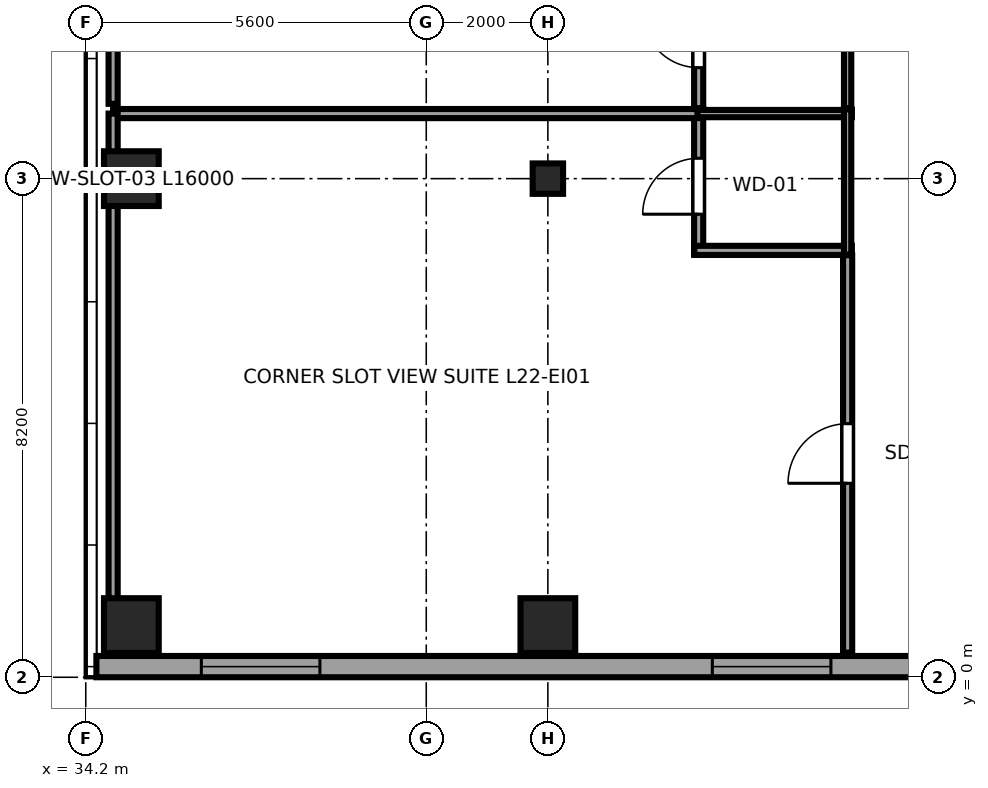
"""IFC4 building model, lengths in metres.
Left out: names, types, materials, properties, quantities, classifications, styles, units other than length and angle.
Written with IfcOpenShell. Run it as: python <this file> out.ifc"""

import sys

from ifc_helpers import new_model, si_unit, direction, frame, frame_2d, origin, origin_2d, place, context, subcontext, project, spatial, rectangle, i_section, extrude, source, transform, mapped, element, fill, save


model = new_model("IFC4")
c1 = context("Model", 3, precision=1e-05, world=origin(), true_north=direction((0.0, 1.0)))
c2 = subcontext(c1, "Body", "Model", "MODEL_VIEW")
j1 = project(units=[si_unit("LENGTHUNIT", "METRE"), si_unit("PLANEANGLEUNIT", "RADIAN")], contexts=[c1])
p1 = place(None, origin())
s1 = spatial("IfcSite", under=j1, at=p1, CompositionType="ELEMENT")
p2 = place(p1, origin())
s2 = spatial("IfcBuilding", under=s1, at=p2, CompositionType="ELEMENT")
p3 = place(p2, frame((0.0, 0.0, 88.8)))
s3 = spatial("IfcBuildingStorey", under=s2, at=p3, CompositionType="ELEMENT", Elevation=88.8)
m1 = source(origin(), c2, "Body", "SweptSolid", [
    extrude(rectangle(XDim=0.9, YDim=0.9, at=origin_2d()), origin(), (0.0, 0.0, 1.0), 3.55),
])
for number, where, z_axis, x_axis in (
    (1, (34.95, 0.85, 0.0), (0.0, 0.0, 1.0), (1.0, 0.0, 0.0)),
    (2, (34.95, 8.2, 0.0), (0.0, 0.0, 1.0), (1.0, 0.0, 0.0)),
    (3, (41.8, 0.85, 0.0), (0.0, 0.0, 1.0), (1.0, 0.0, 0.0)),
):
    element("IfcColumn", number, at=place(p3, frame(where, z_axis=z_axis, x_axis=x_axis)), inside=s3, PredefinedType="COLUMN", context=c2, shape_type="MappedRepresentation", body=[
        mapped(m1, transform((0.0, 0.0, 0.0), x_axis=(1.0, 0.0, 0.0), y_axis=(0.0, 1.0, 0.0), z_axis=(0.0, 0.0, 1.0), scale=1.0)),
    ])
m2 = source(origin(), c2, "Body", "SweptSolid", [
    extrude(i_section(OverallWidth=0.5, OverallDepth=0.5, WebThickness=0.022, FlangeThickness=0.034, at=origin_2d()), origin(), (0.0, 0.0, 1.0), 3.55),
])
p4 = place(p3, frame((41.8, 8.2, 0.0), z_axis=(0.0, 0.0, 1.0), x_axis=(1.0, 0.0, 0.0)))
e4 = element("IfcColumn", 4, at=p4, inside=s3, PredefinedType="COLUMN", context=c2, shape_type="MappedRepresentation", body=[
    mapped(m2, transform((0.0, 0.0, 0.0), x_axis=(1.0, 0.0, 0.0), y_axis=(0.0, 1.0, 0.0), z_axis=(0.0, 0.0, 1.0), scale=1.0)),
])
p5 = place(p3, frame((34.375, 0.175, 0.0), z_axis=(0.0, 0.0, 1.0), x_axis=(1.0, 0.0, 0.0)))
e5 = element("IfcWall", 5, at=p5, inside=s3, PredefinedType="SOLIDWALL", context=c2, shape_type="SweptSolid", body=[
    extrude(rectangle(XDim=18.008, YDim=0.35, at=frame_2d((9.004, 0.0))), origin(), (0.0, 0.0, 1.0), 3.37),
])
p6 = place(p5, frame((1.726, 0.0, 0.68)))
e6 = element("IfcOpeningElement", 6, at=p6, cuts=e5, PredefinedType="OPENING", context=c2, shape_type="SweptSolid", body=[
    extrude(rectangle(XDim=1.95, YDim=1.82, at=frame_2d((0.975, 0.91))), frame((0.0, 0.185, 0.0), z_axis=(0.0, -1.0, 0.0), x_axis=(1.0, 0.0, 0.0)), (0.0, 0.0, 1.0), 0.37),
])
p7 = place(p5, frame((10.13, 0.0, 0.68)))
e7 = element("IfcOpeningElement", 7, at=p7, cuts=e5, PredefinedType="OPENING", context=c2, shape_type="SweptSolid", body=[
    extrude(rectangle(XDim=1.95, YDim=1.82, at=frame_2d((0.975, 0.91))), frame((0.0, 0.185, 0.0), z_axis=(0.0, -1.0, 0.0), x_axis=(1.0, 0.0, 0.0)), (0.0, 0.0, 1.0), 0.37),
])
p8 = place(p3, frame((44.28, 6.95, 0.0), z_axis=(0.0, 0.0, 1.0), x_axis=(0.0, 1.0, 0.0)))
e8 = element("IfcWall", 8, at=p8, inside=s3, PredefinedType="PARTITIONING", context=c2, shape_type="SweptSolid", body=[
    extrude(rectangle(XDim=2.39, YDim=0.15, at=frame_2d((1.195, 0.0))), origin(), (0.0, 0.0, 1.0), 3.37),
])
p9 = place(p8, frame((0.665, 0.0, 0.0)))
e9 = element("IfcOpeningElement", 9, at=p9, cuts=e8, PredefinedType="OPENING", context=c2, shape_type="SweptSolid", body=[
    extrude(rectangle(XDim=0.92, YDim=2.01, at=frame_2d((0.46, 1.005))), frame((0.0, 0.085, 0.0), z_axis=(0.0, -1.0, 0.0), x_axis=(1.0, 0.0, 0.0)), (0.0, 0.0, 1.0), 0.17),
])
p10 = place(p3, frame((44.21, 7.02, 0.0), z_axis=(0.0, 0.0, 1.0), x_axis=(1.0, 0.0, 0.0)))
e10 = element("IfcWall", 10, at=p10, inside=s3, PredefinedType="PARTITIONING", context=c2, shape_type="SweptSolid", body=[
    extrude(rectangle(XDim=2.59, YDim=0.15, at=frame_2d((1.295, 0.0))), origin(), (0.0, 0.0, 1.0), 3.37),
])
p11 = place(p3, frame((44.21, 9.27, 0.0), z_axis=(0.0, 0.0, 1.0), x_axis=(1.0, 0.0, 0.0)))
e11 = element("IfcWall", 11, at=p11, inside=s3, PredefinedType="PLUMBINGWALL", context=c2, shape_type="SweptSolid", body=[
    extrude(rectangle(XDim=2.59, YDim=0.12, at=frame_2d((1.295, 0.0))), origin(), (0.0, 0.0, 1.0), 3.37),
])
p12 = place(p3, frame((46.73, 6.95, 0.0), z_axis=(0.0, 0.0, 1.0), x_axis=(0.0, 1.0, 0.0)))
e12 = element("IfcWall", 12, at=p12, inside=s3, PredefinedType="PLUMBINGWALL", context=c2, shape_type="SweptSolid", body=[
    extrude(rectangle(XDim=2.39, YDim=0.12, at=frame_2d((1.195, 0.0))), origin(), (0.0, 0.0, 1.0), 3.37),
])
p13 = place(p3, frame((44.28, 9.36, 0.0), z_axis=(0.0, 0.0, 1.0), x_axis=(0.0, 1.0, 0.0)))
e13 = element("IfcWall", 13, at=p13, inside=s3, PredefinedType="PARTITIONING", context=c2, shape_type="SweptSolid", body=[
    extrude(rectangle(XDim=2.39, YDim=0.15, at=frame_2d((1.195, 0.0))), origin(), (0.0, 0.0, 1.0), 3.37),
])
p14 = place(p13, frame((0.665, 0.0, 0.0)))
e14 = element("IfcOpeningElement", 14, at=p14, cuts=e13, PredefinedType="OPENING", context=c2, shape_type="SweptSolid", body=[
    extrude(rectangle(XDim=0.92, YDim=2.01, at=frame_2d((0.46, 1.005))), frame((0.0, 0.085, 0.0), z_axis=(0.0, -1.0, 0.0), x_axis=(1.0, 0.0, 0.0)), (0.0, 0.0, 1.0), 0.17),
])
p15 = place(p3, frame((46.73, 9.36, 0.0), z_axis=(0.0, 0.0, 1.0), x_axis=(0.0, 1.0, 0.0)))
e15 = element("IfcWall", 15, at=p15, inside=s3, PredefinedType="PLUMBINGWALL", context=c2, shape_type="SweptSolid", body=[
    extrude(rectangle(XDim=2.39, YDim=0.12, at=frame_2d((1.195, 0.0))), origin(), (0.0, 0.0, 1.0), 3.37),
])
p16 = place(p3, frame((46.73, 0.405, 0.0), z_axis=(0.0, 0.0, 1.0), x_axis=(0.0, 1.0, 0.0)))
e16 = element("IfcWall", 16, at=p16, inside=s3, PredefinedType="PARTITIONING", context=c2, shape_type="SweptSolid", body=[
    extrude(rectangle(XDim=6.535, YDim=0.15, at=frame_2d((3.268, 0.0))), origin(), (0.0, 0.0, 1.0), 3.37),
])
p17 = place(p16, frame((2.785, 0.0, 0.0)))
e17 = element("IfcOpeningElement", 17, at=p17, cuts=e16, PredefinedType="OPENING", context=c2, shape_type="SweptSolid", body=[
    extrude(rectangle(XDim=0.98, YDim=2.12, at=frame_2d((0.49, 1.06))), frame((0.0, 0.085, 0.0), z_axis=(0.0, -1.0, 0.0), x_axis=(1.0, 0.0, 0.0)), (0.0, 0.0, 1.0), 0.17),
])
p18 = place(p3, frame((34.65, 9.27, 0.0), z_axis=(0.0, 0.0, 1.0), x_axis=(1.0, 0.0, 0.0)))
e18 = element("IfcWall", 18, at=p18, inside=s3, PredefinedType="PARTITIONING", context=c2, shape_type="SweptSolid", body=[
    extrude(rectangle(XDim=9.61, YDim=0.15, at=frame_2d((4.805, 0.0))), origin(), (0.0, 0.0, 1.0), 3.37),
])
p19 = place(p3, frame((34.65, 0.405, 0.0), z_axis=(0.0, 0.0, 1.0), x_axis=(0.0, 1.0, 0.0)))
e19 = element("IfcWall", 19, at=p19, inside=s3, PredefinedType="PARTITIONING", context=c2, shape_type="SweptSolid", body=[
    extrude(rectangle(XDim=8.865, YDim=0.15, at=frame_2d((4.433, 0.0))), origin(), (0.0, 0.0, 1.0), 3.37),
])
p20 = place(p3, frame((34.65, 9.43, 0.0), z_axis=(0.0, 0.0, 1.0), x_axis=(0.0, 1.0, 0.0)))
e20 = element("IfcWall", 20, at=p20, inside=s3, PredefinedType="PARTITIONING", context=c2, shape_type="SweptSolid", body=[
    extrude(rectangle(XDim=8.79, YDim=0.15, at=frame_2d((4.395, 0.0))), origin(), (0.0, 0.0, 1.0), 3.37),
])
m3 = source(origin(), c2, "Body", "SweptSolid", [
    extrude(rectangle(XDim=1.95, YDim=1.82, at=frame_2d((0.975, 0.91))), frame((0.0, 0.09, 0.0), z_axis=(0.0, -1.0, 0.0), x_axis=(1.0, 0.0, 0.0)), (0.0, 0.0, 1.0), 0.06),
])
p21 = place(p6, origin())
e21 = element("IfcWindow", 21, at=p21, inside=s3, PartitioningType="DOUBLE_PANEL_VERTICAL", PredefinedType="WINDOW", context=c2, shape_type="MappedRepresentation", body=[
    mapped(m3, transform((0.0, 0.0, 0.0), x_axis=(1.0, 0.0, 0.0), y_axis=(0.0, 1.0, 0.0), z_axis=(0.0, 0.0, 1.0), scale=1.0)),
])
fill(e6, e21)
p22 = place(p7, origin())
e22 = element("IfcWindow", 22, at=p22, inside=s3, PartitioningType="DOUBLE_PANEL_VERTICAL", PredefinedType="WINDOW", context=c2, shape_type="MappedRepresentation", body=[
    mapped(m3, transform((0.0, 0.0, 0.0), x_axis=(1.0, 0.0, 0.0), y_axis=(0.0, 1.0, 0.0), z_axis=(0.0, 0.0, 1.0), scale=1.0)),
])
fill(e7, e22)
m4 = source(origin(), c2, "Body", "SweptSolid", [
    extrude(rectangle(XDim=0.92, YDim=2.01, at=frame_2d((0.46, 1.005))), frame((0.0, 0.025, 0.0), z_axis=(0.0, -1.0, 0.0), x_axis=(1.0, 0.0, 0.0)), (0.0, 0.0, 1.0), 0.05),
])
p23 = place(p9, origin())
e23 = element("IfcDoor", 23, at=p23, inside=s3, OperationType="SINGLE_SWING_LEFT", PredefinedType="DOOR", context=c2, shape_type="MappedRepresentation", body=[
    mapped(m4, transform((0.0, 0.0, 0.0), x_axis=(1.0, 0.0, 0.0), y_axis=(0.0, 1.0, 0.0), z_axis=(0.0, 0.0, 1.0), scale=1.0)),
])
fill(e9, e23)
p24 = place(p14, origin())
e24 = element("IfcDoor", 24, at=p24, inside=s3, OperationType="SINGLE_SWING_RIGHT", PredefinedType="DOOR", context=c2, shape_type="MappedRepresentation", body=[
    mapped(m4, transform((0.0, 0.0, 0.0), x_axis=(1.0, 0.0, 0.0), y_axis=(0.0, 1.0, 0.0), z_axis=(0.0, 0.0, 1.0), scale=1.0)),
])
fill(e14, e24)
m5 = source(origin(), c2, "Body", "SweptSolid", [
    extrude(rectangle(XDim=0.98, YDim=2.12, at=frame_2d((0.49, 1.06))), frame((0.0, 0.025, 0.0), z_axis=(0.0, -1.0, 0.0), x_axis=(1.0, 0.0, 0.0)), (0.0, 0.0, 1.0), 0.05),
])
p25 = place(p17, origin())
e25 = element("IfcDoor", 25, at=p25, inside=s3, OperationType="SINGLE_SWING_LEFT", PredefinedType="DOOR", context=c2, shape_type="MappedRepresentation", body=[
    mapped(m5, transform((0.0, 0.0, 0.0), x_axis=(1.0, 0.0, 0.0), y_axis=(0.0, 1.0, 0.0), z_axis=(0.0, 0.0, 1.0), scale=1.0)),
])
fill(e17, e25)
save(model, sys.argv[1])
